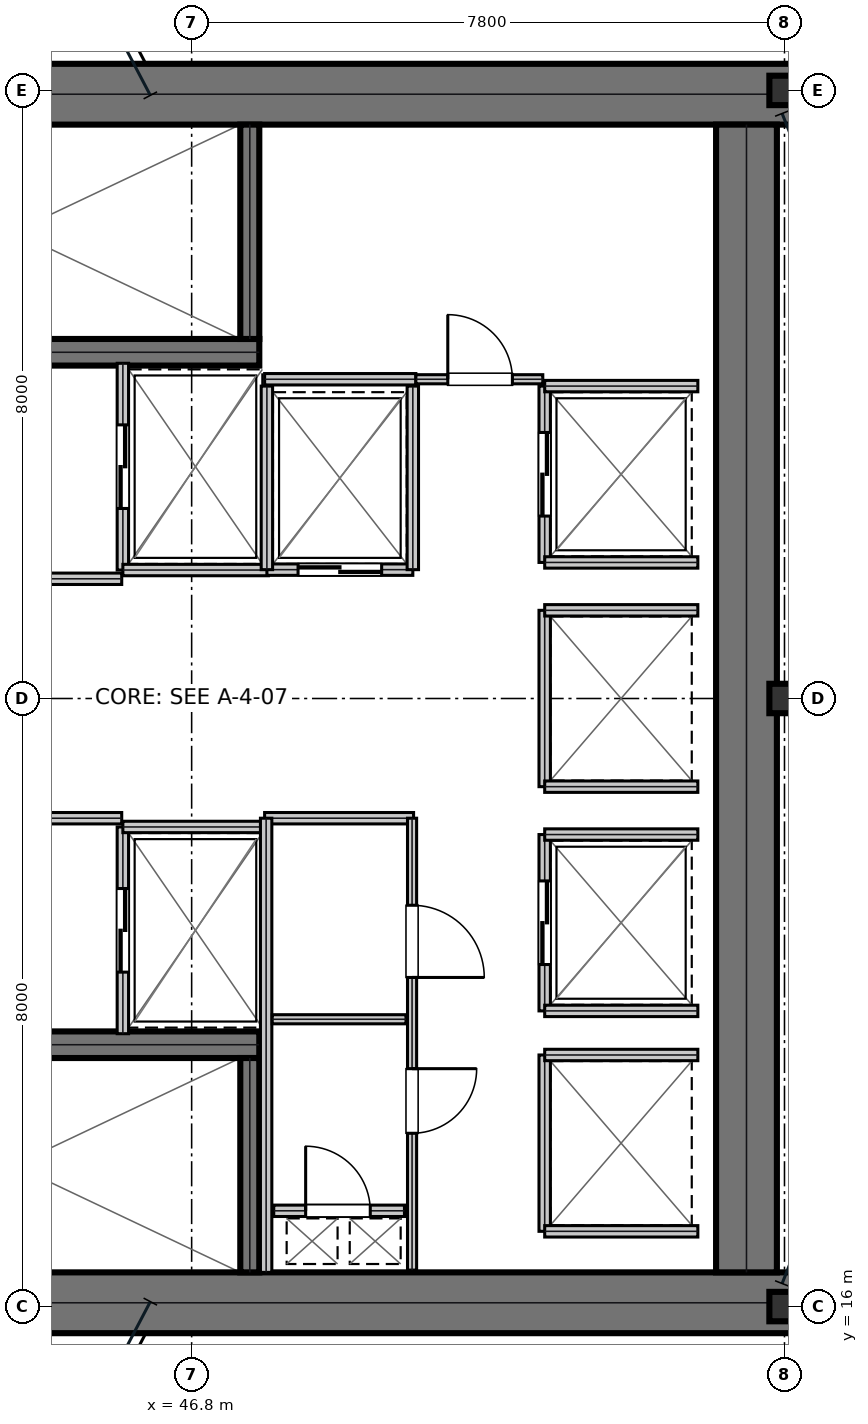
"""IFC4 building model, lengths in metres.
Left out: names, types, materials, properties, quantities, classifications, styles, units other than length and angle.
Written with IfcOpenShell. Run it as: python <this file> out.ifc"""

import sys

from ifc_helpers import new_model, si_unit, direction, frame, frame_2d, origin, origin_2d, place, context, subcontext, project, spatial, rectangle, i_section, extrude, element, fill, save


model = new_model("IFC4")
c1 = context("Model", 3, precision=1e-05, world=origin(), true_north=direction((0.0, 1.0)))
c2 = subcontext(c1, "Body", "Model", "MODEL_VIEW")
j1 = project(units=[si_unit("LENGTHUNIT", "METRE"), si_unit("PLANEANGLEUNIT", "RADIAN")], contexts=[c1])
p1 = place(None, origin())
s1 = spatial("IfcSite", under=j1, at=p1, CompositionType="ELEMENT")
p2 = place(p1, origin())
s2 = spatial("IfcBuilding", under=s1, at=p2, CompositionType="ELEMENT")
p3 = place(p2, frame((0.0, 0.0, 149.25)))
s3 = spatial("IfcBuildingStorey", under=s2, at=p3, CompositionType="ELEMENT", Elevation=149.25)
for number, where, z_axis, x_axis in (
    (1, (38.8, 31.95, 0.0), (0.0, 0.0, 1.0), (1.0, 0.0, 0.0)),
    (2, (38.8, 16.05, 0.0), (0.0, 0.0, 1.0), (1.0, 0.0, 0.0)),
):
    element("IfcWall", number, at=place(p3, frame(where, z_axis=z_axis, x_axis=x_axis)), inside=s3, PredefinedType="SHEAR", context=c2, shape_type="SweptSolid", body=[
        extrude(rectangle(XDim=16.0, YDim=0.8, at=frame_2d((8.0, 0.0))), origin(), (0.0, 0.0, 1.0), 3.81),
    ])
p4 = place(p3, frame((54.1, 16.45, 0.0), z_axis=(0.0, 0.0, 1.0), x_axis=(0.0, 1.0, 0.0)))
e3 = element("IfcWall", 3, at=p4, inside=s3, PredefinedType="SHEAR", context=c2, shape_type="SweptSolid", body=[
    extrude(rectangle(XDim=15.1, YDim=0.8, at=frame_2d((7.55, 0.0))), origin(), (0.0, 0.0, 1.0), 3.81),
])
p5 = place(p3, frame((39.98, 28.555, 0.0), z_axis=(0.0, 0.0, 1.0), x_axis=(1.0, 0.0, 0.0)))
e4 = element("IfcWall", 4, at=p5, inside=s3, PredefinedType="SHEAR", context=c2, shape_type="SweptSolid", body=[
    extrude(rectangle(XDim=7.71, YDim=0.35, at=frame_2d((3.855, 0.0))), origin(), (0.0, 0.0, 1.0), 3.81),
])
p6 = place(p5, frame((0.25, 0.0, 0.0)))
e5 = element("IfcOpeningElement", 5, at=p6, cuts=e4, PredefinedType="OPENING", context=c2, shape_type="SweptSolid", body=[
    extrude(rectangle(XDim=1.1, YDim=2.15, at=frame_2d((0.55, 1.075))), frame((0.0, 0.185, 0.0), z_axis=(0.0, -1.0, 0.0), x_axis=(1.0, 0.0, 0.0)), (0.0, 0.0, 1.0), 0.37),
])
p7 = place(p3, frame((39.98, 19.445, 0.0), z_axis=(0.0, 0.0, 1.0), x_axis=(1.0, 0.0, 0.0)))
e6 = element("IfcWall", 6, at=p7, inside=s3, PredefinedType="SHEAR", context=c2, shape_type="SweptSolid", body=[
    extrude(rectangle(XDim=7.71, YDim=0.35, at=frame_2d((3.855, 0.0))), origin(), (0.0, 0.0, 1.0), 3.81),
])
p8 = place(p7, frame((0.25, 0.0, 0.0)))
e7 = element("IfcOpeningElement", 7, at=p8, cuts=e6, PredefinedType="OPENING", context=c2, shape_type="SweptSolid", body=[
    extrude(rectangle(XDim=1.1, YDim=2.15, at=frame_2d((0.55, 1.075))), frame((0.0, 0.185, 0.0), z_axis=(0.0, -1.0, 0.0), x_axis=(1.0, 0.0, 0.0)), (0.0, 0.0, 1.0), 0.37),
])
for number, where, z_axis, x_axis in (
    (8, (47.565, 28.73, 0.0), (0.0, 0.0, 1.0), (0.0, 1.0, 0.0)),
    (9, (47.565, 16.45, 0.0), (0.0, 0.0, 1.0), (0.0, 1.0, 0.0)),
):
    element("IfcWall", number, at=place(p3, frame(where, z_axis=z_axis, x_axis=x_axis)), inside=s3, PredefinedType="SHEAR", context=c2, shape_type="SweptSolid", body=[
        extrude(rectangle(XDim=2.82, YDim=0.25, at=frame_2d((1.41, 0.0))), origin(), (0.0, 0.0, 1.0), 3.81),
    ])
for number, where, z_axis, x_axis in (
    (10, (54.6, 16.0, 0.0), (0.0, 0.0, 1.0), (1.0, 0.0, 0.0)),
    (11, (54.6, 24.0, 0.0), (0.0, 0.0, 1.0), (1.0, 0.0, 0.0)),
    (12, (54.6, 32.0, 0.0), (0.0, 0.0, 1.0), (1.0, 0.0, 0.0)),
):
    element("IfcColumn", number, at=place(p3, frame(where, z_axis=z_axis, x_axis=x_axis)), inside=s3, PredefinedType="COLUMN", context=c2, shape_type="SweptSolid", body=[
        extrude(i_section(OverallWidth=0.398, OverallDepth=0.387, WebThickness=0.021, FlangeThickness=0.033, at=origin_2d()), origin(), (0.0, 0.0, 1.0), 4.044),
    ])
p9 = place(p3, frame((39.98, 25.575, 0.0), z_axis=(0.0, 0.0, 1.0), x_axis=(1.0, 0.0, 0.0)))
e13 = element("IfcWall", 13, at=p9, inside=s3, PredefinedType="PARTITIONING", context=c2, shape_type="SweptSolid", body=[
    extrude(rectangle(XDim=5.9, YDim=0.15, at=frame_2d((2.95, 0.0))), origin(), (0.0, 0.0, 1.0), 3.81),
])
p10 = place(p9, frame((2.35, 0.0, 0.0)))
e14 = element("IfcOpeningElement", 14, at=p10, cuts=e13, PredefinedType="OPENING", context=c2, shape_type="SweptSolid", body=[
    extrude(rectangle(XDim=1.05, YDim=2.15, at=frame_2d((0.525, 1.075))), frame((0.0, 0.085, 0.0), z_axis=(0.0, -1.0, 0.0), x_axis=(1.0, 0.0, 0.0)), (0.0, 0.0, 1.0), 0.17),
])
p11 = place(p3, frame((39.98, 22.425, 0.0), z_axis=(0.0, 0.0, 1.0), x_axis=(1.0, 0.0, 0.0)))
e15 = element("IfcWall", 15, at=p11, inside=s3, PredefinedType="PARTITIONING", context=c2, shape_type="SweptSolid", body=[
    extrude(rectangle(XDim=5.9, YDim=0.15, at=frame_2d((2.95, 0.0))), origin(), (0.0, 0.0, 1.0), 3.81),
])
p12 = place(p11, frame((2.35, 0.0, 0.0)))
e16 = element("IfcOpeningElement", 16, at=p12, cuts=e15, PredefinedType="OPENING", context=c2, shape_type="SweptSolid", body=[
    extrude(rectangle(XDim=1.05, YDim=2.15, at=frame_2d((0.525, 1.075))), frame((0.0, 0.085, 0.0), z_axis=(0.0, -1.0, 0.0), x_axis=(1.0, 0.0, 0.0)), (0.0, 0.0, 1.0), 0.17),
])
p13 = place(p3, frame((45.895, 25.69, 0.0), z_axis=(0.0, 0.0, 1.0), x_axis=(0.0, 1.0, 0.0)))
e17 = element("IfcWall", 17, at=p13, inside=s3, PredefinedType="PARTITIONING", context=c2, shape_type="SweptSolid", body=[
    extrude(rectangle(XDim=2.72, YDim=0.15, at=frame_2d((1.36, 0.0))), origin(), (0.0, 0.0, 1.0), 3.81),
])
p14 = place(p13, frame((0.81, 0.0, 0.0)))
e18 = element("IfcOpeningElement", 18, at=p14, cuts=e17, PredefinedType="OPENING", context=c2, shape_type="SweptSolid", body=[
    extrude(rectangle(XDim=1.1, YDim=2.15, at=frame_2d((0.55, 1.075))), frame((0.0, 0.085, 0.0), z_axis=(0.0, -1.0, 0.0), x_axis=(1.0, 0.0, 0.0)), (0.0, 0.0, 1.0), 0.17),
])
p15 = place(p3, frame((45.895, 25.69, 0.0), z_axis=(0.0, 0.0, 1.0), x_axis=(1.0, 0.0, 0.0)))
e19 = element("IfcWall", 19, at=p15, inside=s3, PredefinedType="PARTITIONING", context=c2, shape_type="SweptSolid", body=[
    extrude(rectangle(XDim=1.915, YDim=0.15, at=frame_2d((0.958, 0.0))), origin(), (0.0, 0.0, 1.0), 3.81),
])
p16 = place(p3, frame((45.895, 19.59, 0.0), z_axis=(0.0, 0.0, 1.0), x_axis=(0.0, 1.0, 0.0)))
e20 = element("IfcWall", 20, at=p16, inside=s3, PredefinedType="PARTITIONING", context=c2, shape_type="SweptSolid", body=[
    extrude(rectangle(XDim=2.72, YDim=0.15, at=frame_2d((1.36, 0.0))), origin(), (0.0, 0.0, 1.0), 3.81),
])
p17 = place(p16, frame((0.81, 0.0, 0.0)))
e21 = element("IfcOpeningElement", 21, at=p17, cuts=e20, PredefinedType="OPENING", context=c2, shape_type="SweptSolid", body=[
    extrude(rectangle(XDim=1.1, YDim=2.15, at=frame_2d((0.55, 1.075))), frame((0.0, 0.085, 0.0), z_axis=(0.0, -1.0, 0.0), x_axis=(1.0, 0.0, 0.0)), (0.0, 0.0, 1.0), 0.17),
])
p18 = place(p3, frame((45.895, 22.31, 0.0), z_axis=(0.0, 0.0, 1.0), x_axis=(1.0, 0.0, 0.0)))
e22 = element("IfcWall", 22, at=p18, inside=s3, PredefinedType="PARTITIONING", context=c2, shape_type="SweptSolid", body=[
    extrude(rectangle(XDim=1.915, YDim=0.15, at=frame_2d((0.958, 0.0))), origin(), (0.0, 0.0, 1.0), 3.81),
])
p19 = place(p3, frame((47.79, 25.695, 0.0), z_axis=(0.0, 0.0, 1.0), x_axis=(1.0, 0.0, 0.0)))
e23 = element("IfcWall", 23, at=p19, inside=s3, PredefinedType="PARTITIONING", context=c2, shape_type="SweptSolid", body=[
    extrude(rectangle(XDim=1.92, YDim=0.15, at=frame_2d((0.96, 0.0))), origin(), (0.0, 0.0, 1.0), 3.81),
])
p20 = place(p19, frame((0.41, 0.0, 0.0)))
e24 = element("IfcOpeningElement", 24, at=p20, cuts=e23, PredefinedType="OPENING", context=c2, shape_type="SweptSolid", body=[
    extrude(rectangle(XDim=1.1, YDim=2.15, at=frame_2d((0.55, 1.075))), frame((0.0, 0.085, 0.0), z_axis=(0.0, -1.0, 0.0), x_axis=(1.0, 0.0, 0.0)), (0.0, 0.0, 1.0), 0.17),
])
for number, where, z_axis, x_axis in (
    (25, (47.79, 25.695, 0.0), (0.0, 0.0, 1.0), (0.0, 1.0, 0.0)),
    (26, (49.71, 25.695, 0.0), (0.0, 0.0, 1.0), (0.0, 1.0, 0.0)),
):
    element("IfcWall", number, at=place(p3, frame(where, z_axis=z_axis, x_axis=x_axis)), inside=s3, PredefinedType="PARTITIONING", context=c2, shape_type="SweptSolid", body=[
        extrude(rectangle(XDim=2.415, YDim=0.15, at=frame_2d((1.208, 0.0))), origin(), (0.0, 0.0, 1.0), 3.81),
    ])
p21 = place(p3, frame((51.445, 25.79, 0.0), z_axis=(0.0, 0.0, 1.0), x_axis=(0.0, 1.0, 0.0)))
e27 = element("IfcWall", 27, at=p21, inside=s3, PredefinedType="PARTITIONING", context=c2, shape_type="SweptSolid", body=[
    extrude(rectangle(XDim=2.32, YDim=0.15, at=frame_2d((1.16, 0.0))), origin(), (0.0, 0.0, 1.0), 3.81),
])
p22 = place(p21, frame((0.61, 0.0, 0.0)))
e28 = element("IfcOpeningElement", 28, at=p22, cuts=e27, PredefinedType="OPENING", context=c2, shape_type="SweptSolid", body=[
    extrude(rectangle(XDim=1.1, YDim=2.15, at=frame_2d((0.55, 1.075))), frame((0.0, 0.085, 0.0), z_axis=(0.0, -1.0, 0.0), x_axis=(1.0, 0.0, 0.0)), (0.0, 0.0, 1.0), 0.17),
])
for number, where, z_axis, x_axis in (
    (29, (51.445, 25.79, 0.0), (0.0, 0.0, 1.0), (1.0, 0.0, 0.0)),
    (30, (51.445, 28.11, 0.0), (0.0, 0.0, 1.0), (1.0, 0.0, 0.0)),
):
    element("IfcWall", number, at=place(p3, frame(where, z_axis=z_axis, x_axis=x_axis)), inside=s3, PredefinedType="PARTITIONING", context=c2, shape_type="SweptSolid", body=[
        extrude(rectangle(XDim=2.015, YDim=0.15, at=frame_2d((1.007, 0.0))), origin(), (0.0, 0.0, 1.0), 3.81),
    ])
p23 = place(p3, frame((51.445, 19.89, 0.0), z_axis=(0.0, 0.0, 1.0), x_axis=(0.0, 1.0, 0.0)))
e31 = element("IfcWall", 31, at=p23, inside=s3, PredefinedType="PARTITIONING", context=c2, shape_type="SweptSolid", body=[
    extrude(rectangle(XDim=2.32, YDim=0.15, at=frame_2d((1.16, 0.0))), origin(), (0.0, 0.0, 1.0), 3.81),
])
p24 = place(p23, frame((0.61, 0.0, 0.0)))
e32 = element("IfcOpeningElement", 32, at=p24, cuts=e31, PredefinedType="OPENING", context=c2, shape_type="SweptSolid", body=[
    extrude(rectangle(XDim=1.1, YDim=2.15, at=frame_2d((0.55, 1.075))), frame((0.0, 0.085, 0.0), z_axis=(0.0, -1.0, 0.0), x_axis=(1.0, 0.0, 0.0)), (0.0, 0.0, 1.0), 0.17),
])
for number, where, z_axis, x_axis in (
    (33, (51.445, 19.89, 0.0), (0.0, 0.0, 1.0), (1.0, 0.0, 0.0)),
    (34, (51.445, 22.21, 0.0), (0.0, 0.0, 1.0), (1.0, 0.0, 0.0)),
):
    element("IfcWall", number, at=place(p3, frame(where, z_axis=z_axis, x_axis=x_axis)), inside=s3, PredefinedType="PARTITIONING", context=c2, shape_type="SweptSolid", body=[
        extrude(rectangle(XDim=2.015, YDim=0.15, at=frame_2d((1.007, 0.0))), origin(), (0.0, 0.0, 1.0), 3.81),
    ])
p25 = place(p3, frame((51.445, 22.84, 0.0), z_axis=(0.0, 0.0, 1.0), x_axis=(0.0, 1.0, 0.0)))
e35 = element("IfcWall", 35, at=p25, inside=s3, PredefinedType="PARTITIONING", context=c2, shape_type="SweptSolid", body=[
    extrude(rectangle(XDim=2.32, YDim=0.15, at=frame_2d((1.16, 0.0))), origin(), (0.0, 0.0, 1.0), 3.81),
])
for number, where, z_axis, x_axis in (
    (36, (51.445, 22.84, 0.0), (0.0, 0.0, 1.0), (1.0, 0.0, 0.0)),
    (37, (51.445, 25.16, 0.0), (0.0, 0.0, 1.0), (1.0, 0.0, 0.0)),
):
    element("IfcWall", number, at=place(p3, frame(where, z_axis=z_axis, x_axis=x_axis)), inside=s3, PredefinedType="PARTITIONING", context=c2, shape_type="SweptSolid", body=[
        extrude(rectangle(XDim=2.015, YDim=0.15, at=frame_2d((1.007, 0.0))), origin(), (0.0, 0.0, 1.0), 3.81),
    ])
p26 = place(p3, frame((51.445, 16.99, 0.0), z_axis=(0.0, 0.0, 1.0), x_axis=(0.0, 1.0, 0.0)))
e38 = element("IfcWall", 38, at=p26, inside=s3, PredefinedType="PARTITIONING", context=c2, shape_type="SweptSolid", body=[
    extrude(rectangle(XDim=2.32, YDim=0.15, at=frame_2d((1.16, 0.0))), origin(), (0.0, 0.0, 1.0), 3.81),
])
for number, where, z_axis, x_axis in (
    (39, (51.445, 16.99, 0.0), (0.0, 0.0, 1.0), (1.0, 0.0, 0.0)),
    (40, (51.445, 19.31, 0.0), (0.0, 0.0, 1.0), (1.0, 0.0, 0.0)),
):
    element("IfcWall", number, at=place(p3, frame(where, z_axis=z_axis, x_axis=x_axis)), inside=s3, PredefinedType="PARTITIONING", context=c2, shape_type="SweptSolid", body=[
        extrude(rectangle(XDim=2.015, YDim=0.15, at=frame_2d((1.007, 0.0))), origin(), (0.0, 0.0, 1.0), 3.81),
    ])
p27 = place(p3, frame((47.88, 17.26, 0.0), z_axis=(0.0, 0.0, 1.0), x_axis=(1.0, 0.0, 0.0)))
e41 = element("IfcWall", 41, at=p27, inside=s3, PredefinedType="PARTITIONING", context=c2, shape_type="SweptSolid", body=[
    extrude(rectangle(XDim=1.72, YDim=0.15, at=frame_2d((0.86, 0.0))), origin(), (0.0, 0.0, 1.0), 3.81),
])
p28 = place(p27, frame((0.42, 0.0, 0.0)))
e42 = element("IfcOpeningElement", 42, at=p28, cuts=e41, PredefinedType="OPENING", context=c2, shape_type="SweptSolid", body=[
    extrude(rectangle(XDim=0.85, YDim=2.15, at=frame_2d((0.425, 1.075))), frame((0.0, 0.085, 0.0), z_axis=(0.0, -1.0, 0.0), x_axis=(1.0, 0.0, 0.0)), (0.0, 0.0, 1.0), 0.17),
])
p29 = place(p3, frame((47.76, 22.425, 0.0), z_axis=(0.0, 0.0, 1.0), x_axis=(1.0, 0.0, 0.0)))
e43 = element("IfcWall", 43, at=p29, inside=s3, PredefinedType="PARTITIONING", context=c2, shape_type="SweptSolid", body=[
    extrude(rectangle(XDim=1.96, YDim=0.15, at=frame_2d((0.98, 0.0))), origin(), (0.0, 0.0, 1.0), 3.81),
])
p30 = place(p3, frame((47.78, 16.45, 0.0), z_axis=(0.0, 0.0, 1.0), x_axis=(0.0, 1.0, 0.0)))
e44 = element("IfcWall", 44, at=p30, inside=s3, PredefinedType="PARTITIONING", context=c2, shape_type="SweptSolid", body=[
    extrude(rectangle(XDim=5.975, YDim=0.15, at=frame_2d((2.988, 0.0))), origin(), (0.0, 0.0, 1.0), 3.81),
])
p31 = place(p3, frame((47.86, 19.78, 0.0), z_axis=(0.0, 0.0, 1.0), x_axis=(1.0, 0.0, 0.0)))
e45 = element("IfcWall", 45, at=p31, inside=s3, PredefinedType="PARTITIONING", context=c2, shape_type="SweptSolid", body=[
    extrude(rectangle(XDim=1.76, YDim=0.12, at=frame_2d((0.88, 0.0))), origin(), (0.0, 0.0, 1.0), 3.81),
])
p32 = place(p3, frame((49.7, 16.48, 0.0), z_axis=(0.0, 0.0, 1.0), x_axis=(0.0, 1.0, 0.0)))
e46 = element("IfcWall", 46, at=p32, inside=s3, PredefinedType="PARTITIONING", context=c2, shape_type="SweptSolid", body=[
    extrude(rectangle(XDim=5.945, YDim=0.12, at=frame_2d((2.973, 0.0))), origin(), (0.0, 0.0, 1.0), 3.81),
])
p33 = place(p32, frame((1.8, 0.0, 0.0)))
e47 = element("IfcOpeningElement", 47, at=p33, cuts=e46, PredefinedType="OPENING", context=c2, shape_type="SweptSolid", body=[
    extrude(rectangle(XDim=0.85, YDim=2.15, at=frame_2d((0.425, 1.075))), frame((0.0, 0.07, 0.0), z_axis=(0.0, -1.0, 0.0), x_axis=(1.0, 0.0, 0.0)), (0.0, 0.0, 1.0), 0.14),
])
p34 = place(p32, frame((3.85, 0.0, 0.0)))
e48 = element("IfcOpeningElement", 48, at=p34, cuts=e46, PredefinedType="OPENING", context=c2, shape_type="SweptSolid", body=[
    extrude(rectangle(XDim=0.95, YDim=2.15, at=frame_2d((0.475, 1.075))), frame((0.0, 0.07, 0.0), z_axis=(0.0, -1.0, 0.0), x_axis=(1.0, 0.0, 0.0)), (0.0, 0.0, 1.0), 0.14),
])
p35 = place(p3, frame((47.76, 28.2, 0.0), z_axis=(0.0, 0.0, 1.0), x_axis=(1.0, 0.0, 0.0)))
e49 = element("IfcWall", 49, at=p35, inside=s3, PredefinedType="PARTITIONING", context=c2, shape_type="SweptSolid", body=[
    extrude(rectangle(XDim=1.99, YDim=0.15, at=frame_2d((0.995, 0.0))), origin(), (0.0, 0.0, 1.0), 3.81),
])
p36 = place(p3, frame((49.75, 28.2, 0.0), z_axis=(0.0, 0.0, 1.0), x_axis=(1.0, 0.0, 0.0)))
e50 = element("IfcWall", 50, at=p36, inside=s3, PredefinedType="PARTITIONING", context=c2, shape_type="SweptSolid", body=[
    extrude(rectangle(XDim=1.67, YDim=0.12, at=frame_2d((0.835, 0.0))), origin(), (0.0, 0.0, 1.0), 3.81),
])
p37 = place(p36, frame((0.42, 0.0, 0.0)))
e51 = element("IfcOpeningElement", 51, at=p37, cuts=e50, PredefinedType="OPENING", context=c2, shape_type="SweptSolid", body=[
    extrude(rectangle(XDim=0.85, YDim=2.15, at=frame_2d((0.425, 1.075))), frame((0.0, 0.07, 0.0), z_axis=(0.0, -1.0, 0.0), x_axis=(1.0, 0.0, 0.0)), (0.0, 0.0, 1.0), 0.14),
])
p38 = place(p14, frame((1.1, 0.0, 0.0), z_axis=(0.0, 0.0, 1.0), x_axis=(-1.0, 0.0, 0.0)))
e52 = element("IfcDoor", 52, at=p38, inside=s3, OperationType="DOUBLE_DOOR_SLIDING", PredefinedType="DOOR", context=c2, shape_type="SweptSolid", body=[
    extrude(rectangle(XDim=1.1, YDim=2.15, at=frame_2d((0.55, 1.075))), frame((0.0, 0.025, 0.0), z_axis=(0.0, -1.0, 0.0), x_axis=(1.0, 0.0, 0.0)), (0.0, 0.0, 1.0), 0.05),
])
fill(e18, e52)
p39 = place(p17, frame((1.1, 0.0, 0.0), z_axis=(0.0, 0.0, 1.0), x_axis=(-1.0, 0.0, 0.0)))
e53 = element("IfcDoor", 53, at=p39, inside=s3, OperationType="DOUBLE_DOOR_SLIDING", PredefinedType="DOOR", context=c2, shape_type="SweptSolid", body=[
    extrude(rectangle(XDim=1.1, YDim=2.15, at=frame_2d((0.55, 1.075))), frame((0.0, 0.025, 0.0), z_axis=(0.0, -1.0, 0.0), x_axis=(1.0, 0.0, 0.0)), (0.0, 0.0, 1.0), 0.05),
])
fill(e21, e53)
p40 = place(p20, frame((1.1, 0.0, 0.0), z_axis=(0.0, 0.0, 1.0), x_axis=(-1.0, 0.0, 0.0)))
e54 = element("IfcDoor", 54, at=p40, inside=s3, OperationType="DOUBLE_DOOR_SLIDING", PredefinedType="DOOR", context=c2, shape_type="SweptSolid", body=[
    extrude(rectangle(XDim=1.1, YDim=2.15, at=frame_2d((0.55, 1.075))), frame((0.0, 0.025, 0.0), z_axis=(0.0, -1.0, 0.0), x_axis=(1.0, 0.0, 0.0)), (0.0, 0.0, 1.0), 0.05),
])
fill(e24, e54)
p41 = place(p22, frame((1.1, 0.0, 0.0), z_axis=(0.0, 0.0, 1.0), x_axis=(-1.0, 0.0, 0.0)))
e55 = element("IfcDoor", 55, at=p41, inside=s3, OperationType="DOUBLE_DOOR_SLIDING", PredefinedType="DOOR", context=c2, shape_type="SweptSolid", body=[
    extrude(rectangle(XDim=1.1, YDim=2.15, at=frame_2d((0.55, 1.075))), frame((0.0, 0.025, 0.0), z_axis=(0.0, -1.0, 0.0), x_axis=(1.0, 0.0, 0.0)), (0.0, 0.0, 1.0), 0.05),
])
fill(e28, e55)
p42 = place(p24, frame((1.1, 0.0, 0.0), z_axis=(0.0, 0.0, 1.0), x_axis=(-1.0, 0.0, 0.0)))
e56 = element("IfcDoor", 56, at=p42, inside=s3, OperationType="DOUBLE_DOOR_SLIDING", PredefinedType="DOOR", context=c2, shape_type="SweptSolid", body=[
    extrude(rectangle(XDim=1.1, YDim=2.15, at=frame_2d((0.55, 1.075))), frame((0.0, 0.025, 0.0), z_axis=(0.0, -1.0, 0.0), x_axis=(1.0, 0.0, 0.0)), (0.0, 0.0, 1.0), 0.05),
])
fill(e32, e56)
p43 = place(p28, origin())
e57 = element("IfcDoor", 57, at=p43, inside=s3, OperationType="SINGLE_SWING_LEFT", PredefinedType="TRAPDOOR", context=c2, shape_type="SweptSolid", body=[
    extrude(rectangle(XDim=0.85, YDim=2.15, at=frame_2d((0.425, 1.075))), frame((0.0, 0.025, 0.0), z_axis=(0.0, -1.0, 0.0), x_axis=(1.0, 0.0, 0.0)), (0.0, 0.0, 1.0), 0.05),
])
fill(e42, e57)
p44 = place(p33, frame((0.85, 0.0, 0.0), z_axis=(0.0, 0.0, 1.0), x_axis=(-1.0, 0.0, 0.0)))
e58 = element("IfcDoor", 58, at=p44, inside=s3, OperationType="SINGLE_SWING_LEFT", PredefinedType="DOOR", context=c2, shape_type="SweptSolid", body=[
    extrude(rectangle(XDim=0.85, YDim=2.15, at=frame_2d((0.425, 1.075))), frame((0.0, 0.025, 0.0), z_axis=(0.0, -1.0, 0.0), x_axis=(1.0, 0.0, 0.0)), (0.0, 0.0, 1.0), 0.05),
])
fill(e47, e58)
p45 = place(p34, frame((0.95, 0.0, 0.0), z_axis=(0.0, 0.0, 1.0), x_axis=(-1.0, 0.0, 0.0)))
e59 = element("IfcDoor", 59, at=p45, inside=s3, OperationType="SINGLE_SWING_RIGHT", PredefinedType="DOOR", context=c2, shape_type="SweptSolid", body=[
    extrude(rectangle(XDim=0.95, YDim=2.15, at=frame_2d((0.475, 1.075))), frame((0.0, 0.025, 0.0), z_axis=(0.0, -1.0, 0.0), x_axis=(1.0, 0.0, 0.0)), (0.0, 0.0, 1.0), 0.05),
])
fill(e48, e59)
p46 = place(p37, origin())
e60 = element("IfcDoor", 60, at=p46, inside=s3, OperationType="SINGLE_SWING_LEFT", PredefinedType="DOOR", context=c2, shape_type="SweptSolid", body=[
    extrude(rectangle(XDim=0.85, YDim=2.15, at=frame_2d((0.425, 1.075))), frame((0.0, 0.025, 0.0), z_axis=(0.0, -1.0, 0.0), x_axis=(1.0, 0.0, 0.0)), (0.0, 0.0, 1.0), 0.05),
])
fill(e51, e60)
save(model, sys.argv[1])
